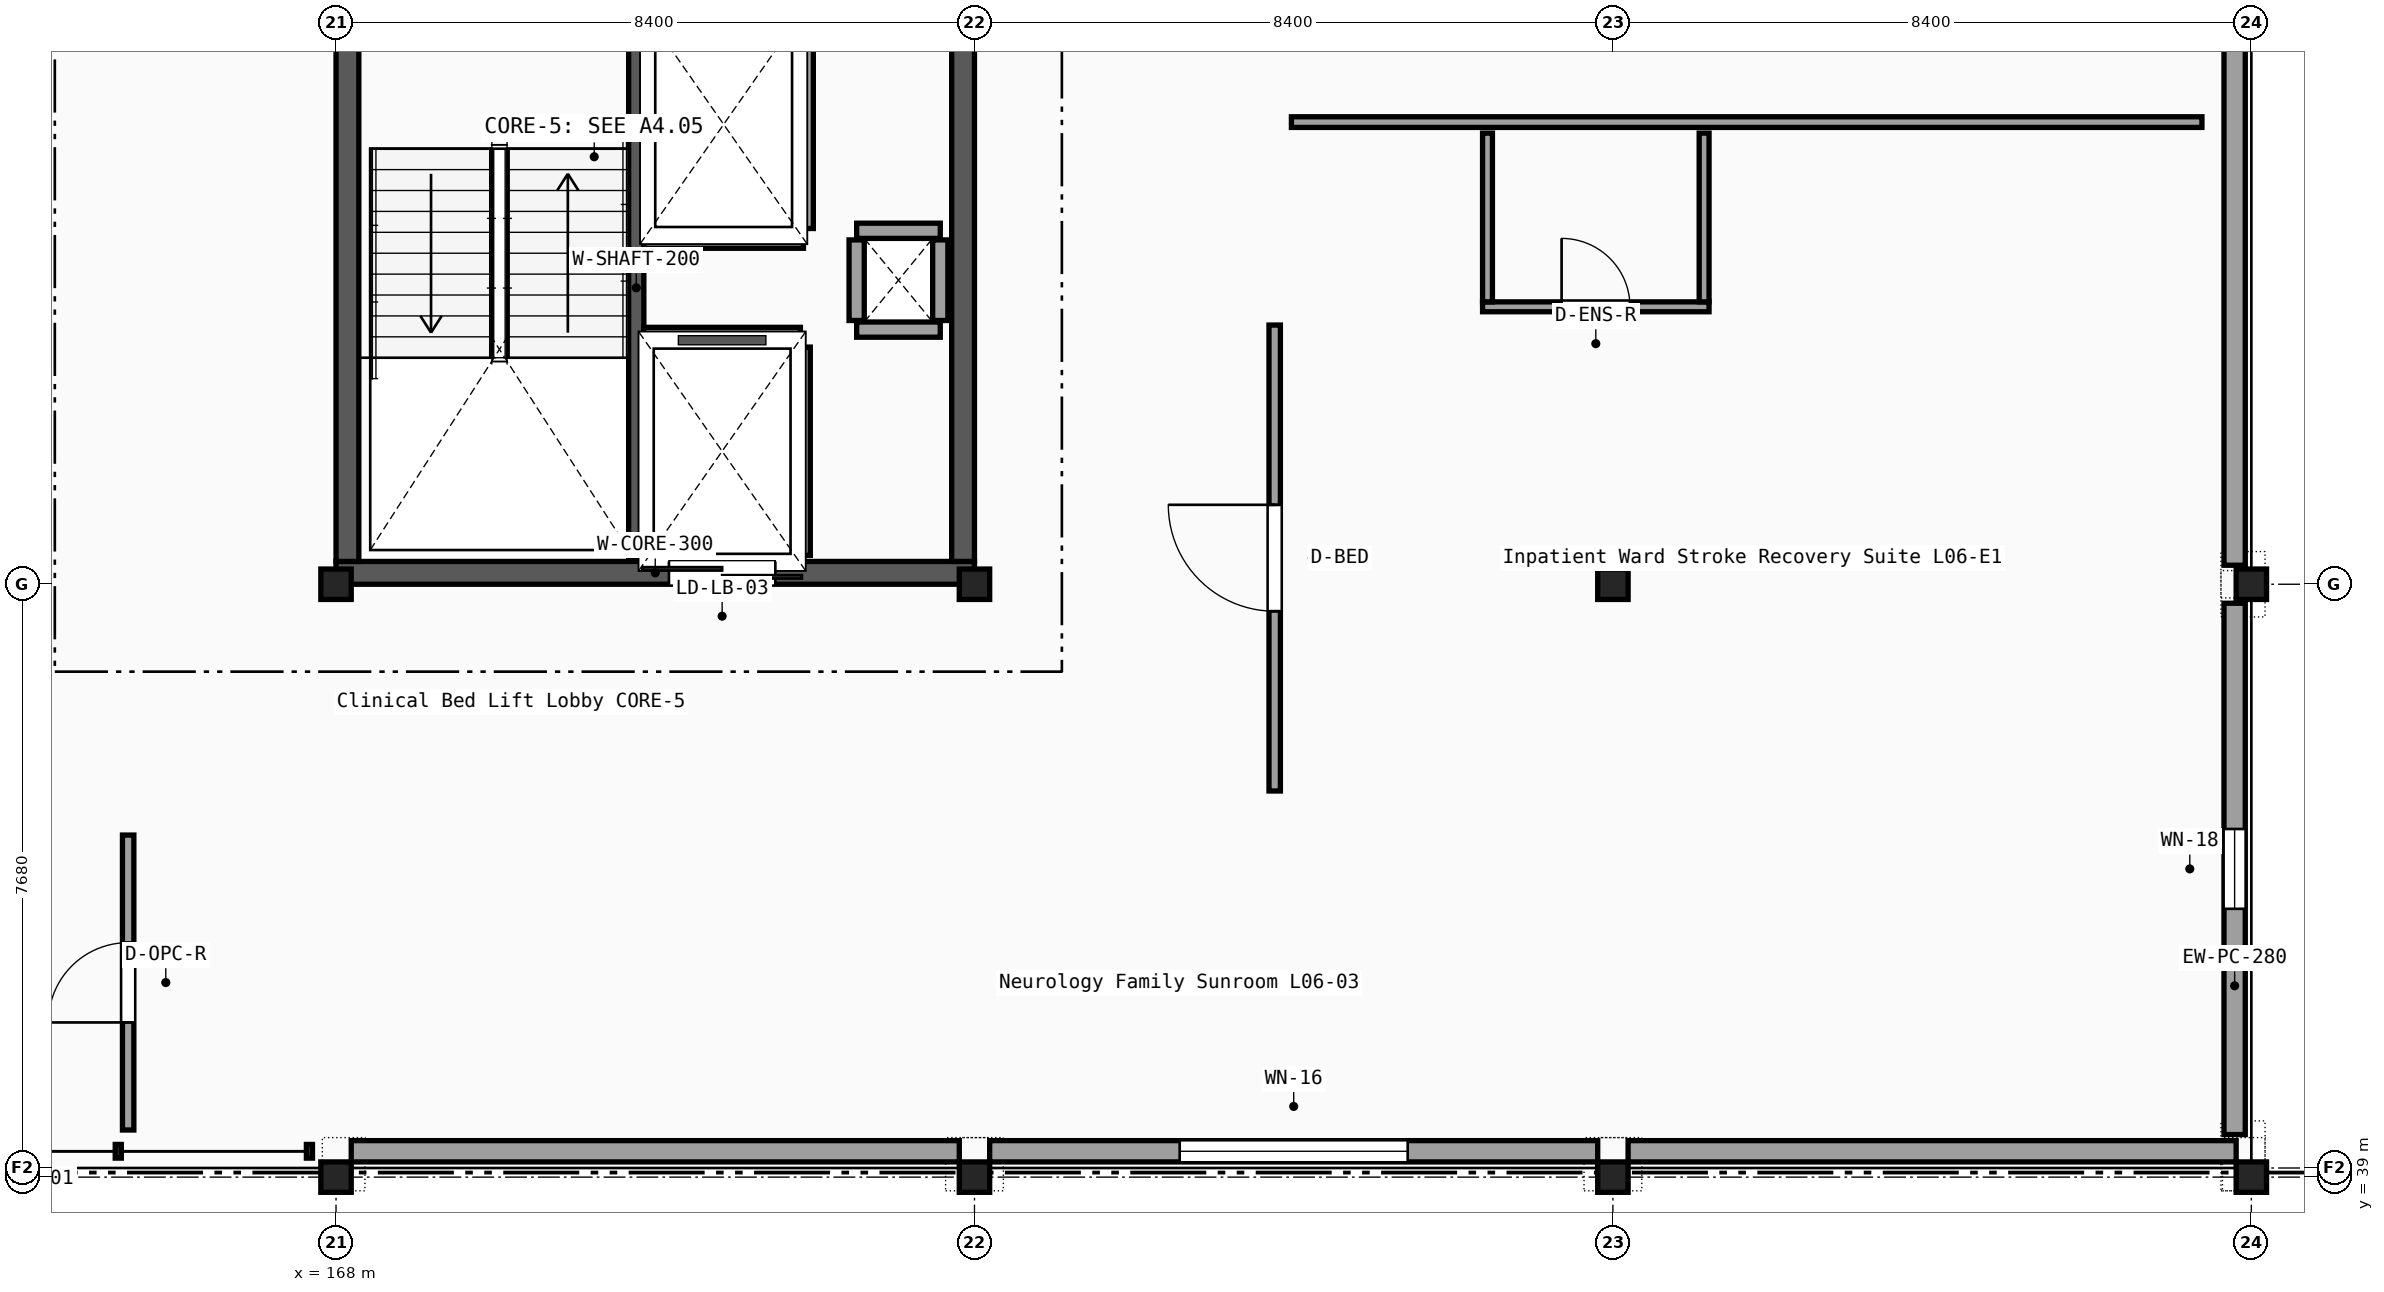
"""IFC4 building model, lengths in metres.
Left out: names, types, materials, properties, quantities, classifications, styles, units other than length and angle.
Written with IfcOpenShell. Run it as: python <this file> out.ifc"""

import sys

from ifc_helpers import new_model, si_unit, direction, frame, frame_2d, origin, origin_2d, place, context, subcontext, project, spatial, rectangle, i_section, extrude, element, fill, save


model = new_model("IFC4")
c1 = context("Model", 3, precision=1e-05, world=origin(), true_north=direction((0.0, 1.0)))
c2 = subcontext(c1, "Body", "Model", "MODEL_VIEW")
j1 = project(units=[si_unit("LENGTHUNIT", "METRE"), si_unit("PLANEANGLEUNIT", "RADIAN")], contexts=[c1])
p1 = place(None, origin())
s1 = spatial("IfcSite", under=j1, at=p1, CompositionType="ELEMENT")
p2 = place(p1, origin())
s2 = spatial("IfcBuilding", under=s1, at=p2, CompositionType="ELEMENT")
p3 = place(p2, frame((0.0, 0.0, 27.0)))
s3 = spatial("IfcBuildingStorey", under=s2, at=p3, CompositionType="ELEMENT", Elevation=27.0)
for number, where, z_axis, x_axis in (
    (1, (168.0, 39.0, 0.0), (0.0, 0.0, 1.0), (1.0, 0.0, 0.0)),
    (2, (168.0, 46.8, 0.0), (0.0, 0.0, 1.0), (1.0, 0.0, 0.0)),
    (3, (176.4, 39.0, 0.0), (0.0, 0.0, 1.0), (1.0, 0.0, 0.0)),
    (4, (176.4, 46.8, 0.0), (0.0, 0.0, 1.0), (1.0, 0.0, 0.0)),
    (5, (184.8, 39.0, 0.0), (0.0, 0.0, 1.0), (1.0, 0.0, 0.0)),
    (6, (184.8, 46.8, 0.0), (0.0, 0.0, 1.0), (1.0, 0.0, 0.0)),
    (7, (193.2, 39.0, 0.0), (0.0, 0.0, 1.0), (1.0, 0.0, 0.0)),
    (8, (193.2, 46.8, 0.0), (0.0, 0.0, 1.0), (1.0, 0.0, 0.0)),
):
    element("IfcColumn", number, at=place(p3, frame(where, z_axis=z_axis, x_axis=x_axis)), inside=s3, PredefinedType="COLUMN", context=c2, shape_type="SweptSolid", body=[
        extrude(i_section(OverallWidth=0.3, OverallDepth=0.4, WebThickness=0.013, FlangeThickness=0.024, FilletRadius=0.027, at=origin_2d()), origin(), (0.0, 0.0, 1.0), 4.05),
    ])
p4 = place(p3, frame((168.2, 39.34, 0.0), z_axis=(0.0, 0.0, 1.0), x_axis=(1.0, 0.0, 0.0)))
e9 = element("IfcWall", 9, at=p4, inside=s3, PredefinedType="SOLIDWALL", context=c2, shape_type="SweptSolid", body=[
    extrude(rectangle(XDim=8.0, YDim=0.28, at=frame_2d((4.0, 0.0))), origin(), (0.0, 0.0, 1.0), 3.53),
])
p5 = place(p3, frame((176.6, 39.34, 0.0), z_axis=(0.0, 0.0, 1.0), x_axis=(1.0, 0.0, 0.0)))
e10 = element("IfcWall", 10, at=p5, inside=s3, PredefinedType="SOLIDWALL", context=c2, shape_type="SweptSolid", body=[
    extrude(rectangle(XDim=8.0, YDim=0.28, at=frame_2d((4.0, 0.0))), origin(), (0.0, 0.0, 1.0), 3.53),
])
p6 = place(p5, frame((2.5, 0.0, 0.7)))
e11 = element("IfcOpeningElement", 11, at=p6, cuts=e10, PredefinedType="OPENING", context=c2, shape_type="SweptSolid", body=[
    extrude(rectangle(XDim=3.0, YDim=1.85, at=frame_2d((1.5, 0.925))), frame((0.0, 0.15, 0.0), z_axis=(0.0, -1.0, 0.0), x_axis=(1.0, 0.0, 0.0)), (0.0, 0.0, 1.0), 0.3),
])
p7 = place(p3, frame((185.0, 39.34, 0.0), z_axis=(0.0, 0.0, 1.0), x_axis=(1.0, 0.0, 0.0)))
e12 = element("IfcWall", 12, at=p7, inside=s3, PredefinedType="SOLIDWALL", context=c2, shape_type="SweptSolid", body=[
    extrude(rectangle(XDim=8.0, YDim=0.28, at=frame_2d((4.0, 0.0))), origin(), (0.0, 0.0, 1.0), 3.53),
])
p8 = place(p3, frame((192.98, 39.56, 0.0), z_axis=(0.0, 0.0, 1.0), x_axis=(0.0, 1.0, 0.0)))
e13 = element("IfcWall", 13, at=p8, inside=s3, PredefinedType="SOLIDWALL", context=c2, shape_type="SweptSolid", body=[
    extrude(rectangle(XDim=6.99, YDim=0.28, at=frame_2d((3.495, 0.0))), origin(), (0.0, 0.0, 1.0), 3.26),
])
p9 = place(p8, frame((2.97, 0.0, 1.3)))
e14 = element("IfcOpeningElement", 14, at=p9, cuts=e13, PredefinedType="OPENING", context=c2, shape_type="SweptSolid", body=[
    extrude(rectangle(XDim=1.05, YDim=1.2, at=frame_2d((0.525, 0.6))), frame((0.0, 0.15, 0.0), z_axis=(0.0, -1.0, 0.0), x_axis=(1.0, 0.0, 0.0)), (0.0, 0.0, 1.0), 0.3),
])
p10 = place(p3, frame((192.98, 47.05, 0.0), z_axis=(0.0, 0.0, 1.0), x_axis=(0.0, 1.0, 0.0)))
e15 = element("IfcWall", 15, at=p10, inside=s3, PredefinedType="SOLIDWALL", context=c2, shape_type="SweptSolid", body=[
    extrude(rectangle(XDim=7.3, YDim=0.28, at=frame_2d((3.65, 0.0))), origin(), (0.0, 0.0, 1.0), 3.26),
])
p11 = place(p3, frame((168.0, 46.95, 0.0), z_axis=(0.0, 0.0, 1.0), x_axis=(1.0, 0.0, 0.0)))
e16 = element("IfcWall", 16, at=p11, inside=s3, PredefinedType="SHEAR", context=c2, shape_type="SweptSolid", body=[
    extrude(rectangle(XDim=8.4, YDim=0.3, at=frame_2d((4.2, 0.0))), origin(), (0.0, 0.0, 1.0), 3.83),
])
p12 = place(p11, frame((4.38, 0.0, 0.0)))
e17 = element("IfcOpeningElement", 17, at=p12, cuts=e16, PredefinedType="OPENING", context=c2, shape_type="SweptSolid", body=[
    extrude(rectangle(XDim=1.4, YDim=2.2, at=frame_2d((0.7, 1.1))), frame((0.0, 0.16, 0.0), z_axis=(0.0, -1.0, 0.0), x_axis=(1.0, 0.0, 0.0)), (0.0, 0.0, 1.0), 0.32),
])
for number, where, z_axis, x_axis in (
    (18, (168.15, 47.1, 0.0), (0.0, 0.0, 1.0), (0.0, 1.0, 0.0)),
    (19, (176.25, 47.1, 0.0), (0.0, 0.0, 1.0), (0.0, 1.0, 0.0)),
):
    element("IfcWall", number, at=place(p3, frame(where, z_axis=z_axis, x_axis=x_axis)), inside=s3, PredefinedType="SHEAR", context=c2, shape_type="SweptSolid", body=[
        extrude(rectangle(XDim=7.2, YDim=0.3, at=frame_2d((3.6, 0.0))), origin(), (0.0, 0.0, 1.0), 3.83),
    ])
p13 = place(p3, frame((171.95, 47.12, 0.0), z_axis=(0.0, 0.0, 1.0), x_axis=(0.0, 1.0, 0.0)))
e20 = element("IfcWall", 20, at=p13, inside=s3, PredefinedType="SHEAR", context=c2, shape_type="SweptSolid", body=[
    extrude(rectangle(XDim=7.16, YDim=0.2, at=frame_2d((3.58, 0.0))), origin(), (0.0, 0.0, 1.0), 3.83),
])
for number, where, z_axis, x_axis in (
    (21, (174.85, 50.15, 0.0), (0.0, 0.0, 1.0), (1.0, 0.0, 0.0)),
    (22, (174.85, 51.45, 0.0), (0.0, 0.0, 1.0), (1.0, 0.0, 0.0)),
):
    element("IfcWall", number, at=place(p3, frame(where, z_axis=z_axis, x_axis=x_axis)), inside=s3, PredefinedType="PARTITIONING", context=c2, shape_type="SweptSolid", body=[
        extrude(rectangle(XDim=1.1, YDim=0.2, at=frame_2d((0.55, 0.0))), origin(), (0.0, 0.0, 1.0), 3.26),
    ])
for number, where, z_axis, x_axis in (
    (23, (174.85, 50.27, 0.0), (0.0, 0.0, 1.0), (0.0, 1.0, 0.0)),
    (24, (175.95, 50.27, 0.0), (0.0, 0.0, 1.0), (0.0, 1.0, 0.0)),
):
    element("IfcWall", number, at=place(p3, frame(where, z_axis=z_axis, x_axis=x_axis)), inside=s3, PredefinedType="PARTITIONING", context=c2, shape_type="SweptSolid", body=[
        extrude(rectangle(XDim=1.06, YDim=0.2, at=frame_2d((0.53, 0.0))), origin(), (0.0, 0.0, 1.0), 3.26),
    ])
p14 = place(p3, frame((174.18, 51.48, 0.0), z_axis=(0.0, 0.0, 1.0), x_axis=(0.0, 1.0, 0.0)))
e25 = element("IfcWall", 25, at=p14, inside=s3, PredefinedType="PARTITIONING", context=c2, shape_type="SweptSolid", body=[
    extrude(rectangle(XDim=2.74, YDim=0.2, at=frame_2d((1.37, 0.0))), origin(), (0.0, 0.0, 1.0), 3.26),
])
p15 = place(p3, frame((172.05, 51.32, 0.0), z_axis=(0.0, 0.0, 1.0), x_axis=(1.0, 0.0, 0.0)))
e26 = element("IfcWall", 26, at=p15, inside=s3, PredefinedType="PARTITIONING", context=c2, shape_type="SweptSolid", body=[
    extrude(rectangle(XDim=2.1, YDim=0.2, at=frame_2d((1.05, 0.0))), origin(), (0.0, 0.0, 1.0), 3.26),
])
p16 = place(p3, frame((174.14, 47.18, 0.0), z_axis=(0.0, 0.0, 1.0), x_axis=(0.0, 1.0, 0.0)))
e27 = element("IfcWall", 27, at=p16, inside=s3, PredefinedType="PARTITIONING", context=c2, shape_type="SweptSolid", body=[
    extrude(rectangle(XDim=2.74, YDim=0.2, at=frame_2d((1.37, 0.0))), origin(), (0.0, 0.0, 1.0), 3.26),
])
p17 = place(p3, frame((172.05, 50.08, 0.0), z_axis=(0.0, 0.0, 1.0), x_axis=(1.0, 0.0, 0.0)))
e28 = element("IfcWall", 28, at=p17, inside=s3, PredefinedType="PARTITIONING", context=c2, shape_type="SweptSolid", body=[
    extrude(rectangle(XDim=2.06, YDim=0.2, at=frame_2d((1.03, 0.0))), origin(), (0.0, 0.0, 1.0), 3.26),
])
p18 = place(p3, frame((165.265, 39.62, 0.0), z_axis=(0.0, 0.0, 1.0), x_axis=(0.0, 1.0, 0.0)))
e29 = element("IfcWall", 29, at=p18, inside=s3, PredefinedType="PARTITIONING", context=c2, shape_type="SweptSolid", body=[
    extrude(rectangle(XDim=3.88, YDim=0.15, at=frame_2d((1.94, 0.0))), origin(), (0.0, 0.0, 1.0), 3.77),
])
p19 = place(p18, frame((1.415, 0.0, 0.0)))
e30 = element("IfcOpeningElement", 30, at=p19, cuts=e29, PredefinedType="OPENING", context=c2, shape_type="SweptSolid", body=[
    extrude(rectangle(XDim=1.05, YDim=2.15, at=frame_2d((0.525, 1.075))), frame((0.0, 0.085, 0.0), z_axis=(0.0, -1.0, 0.0), x_axis=(1.0, 0.0, 0.0)), (0.0, 0.0, 1.0), 0.17),
])
p20 = place(p3, frame((180.35, 44.08, 0.0), z_axis=(0.0, 0.0, 1.0), x_axis=(0.0, 1.0, 0.0)))
e31 = element("IfcWall", 31, at=p20, inside=s3, PredefinedType="PARTITIONING", context=c2, shape_type="SweptSolid", body=[
    extrude(rectangle(XDim=6.13, YDim=0.15, at=frame_2d((3.065, 0.0))), origin(), (0.0, 0.0, 1.0), 3.26),
])
p21 = place(p20, frame((2.365, 0.0, 0.0)))
e32 = element("IfcOpeningElement", 32, at=p21, cuts=e31, PredefinedType="OPENING", context=c2, shape_type="SweptSolid", body=[
    extrude(rectangle(XDim=1.4, YDim=2.2, at=frame_2d((0.7, 1.1))), frame((0.0, 0.085, 0.0), z_axis=(0.0, -1.0, 0.0), x_axis=(1.0, 0.0, 0.0)), (0.0, 0.0, 1.0), 0.17),
])
p22 = place(p3, frame((180.57, 52.88, 0.0), z_axis=(0.0, 0.0, 1.0), x_axis=(1.0, 0.0, 0.0)))
e33 = element("IfcWall", 33, at=p22, inside=s3, PredefinedType="PARTITIONING", context=c2, shape_type="SweptSolid", body=[
    extrude(rectangle(XDim=11.98, YDim=0.14, at=frame_2d((5.99, 0.0))), origin(), (0.0, 0.0, 1.0), 3.54),
])
p23 = place(p3, frame((183.085, 50.45, 0.0), z_axis=(0.0, 0.0, 1.0), x_axis=(1.0, 0.0, 0.0)))
e34 = element("IfcWall", 34, at=p23, inside=s3, PredefinedType="PARTITIONING", context=c2, shape_type="SweptSolid", body=[
    extrude(rectangle(XDim=2.98, YDim=0.13, at=frame_2d((1.49, 0.0))), origin(), (0.0, 0.0, 1.0), 3.54),
])
p24 = place(p23, frame((1.04, 0.0, 0.0)))
e35 = element("IfcOpeningElement", 35, at=p24, cuts=e34, PredefinedType="OPENING", context=c2, shape_type="SweptSolid", body=[
    extrude(rectangle(XDim=0.9, YDim=2.1, at=frame_2d((0.45, 1.05))), frame((0.0, 0.075, 0.0), z_axis=(0.0, -1.0, 0.0), x_axis=(1.0, 0.0, 0.0)), (0.0, 0.0, 1.0), 0.15),
])
for number, where, z_axis, x_axis in (
    (36, (183.15, 50.515, 0.0), (0.0, 0.0, 1.0), (0.0, 1.0, 0.0)),
    (37, (186.0, 50.515, 0.0), (0.0, 0.0, 1.0), (0.0, 1.0, 0.0)),
):
    element("IfcWall", number, at=place(p3, frame(where, z_axis=z_axis, x_axis=x_axis)), inside=s3, PredefinedType="PARTITIONING", context=c2, shape_type="SweptSolid", body=[
        extrude(rectangle(XDim=2.22, YDim=0.13, at=frame_2d((1.11, 0.0))), origin(), (0.0, 0.0, 1.0), 3.77),
    ])
p25 = place(p6, origin())
e38 = element("IfcWindow", 38, at=p25, inside=s3, PartitioningType="SINGLE_PANEL", PredefinedType="WINDOW", context=c2, shape_type="SweptSolid", body=[
    extrude(rectangle(XDim=3.0, YDim=1.85, at=frame_2d((1.5, 0.925))), frame((0.0, 0.03, 0.0), z_axis=(0.0, -1.0, 0.0), x_axis=(1.0, 0.0, 0.0)), (0.0, 0.0, 1.0), 0.06),
])
fill(e11, e38)
p26 = place(p9, origin())
e39 = element("IfcWindow", 39, at=p26, inside=s3, PartitioningType="SINGLE_PANEL", PredefinedType="WINDOW", context=c2, shape_type="SweptSolid", body=[
    extrude(rectangle(XDim=1.05, YDim=1.2, at=frame_2d((0.525, 0.6))), frame((0.0, 0.03, 0.0), z_axis=(0.0, -1.0, 0.0), x_axis=(1.0, 0.0, 0.0)), (0.0, 0.0, 1.0), 0.06),
])
fill(e14, e39)
p27 = place(p12, origin())
e40 = element("IfcDoor", 40, at=p27, inside=s3, OperationType="DOUBLE_DOOR_SLIDING", PredefinedType="DOOR", context=c2, shape_type="SweptSolid", body=[
    extrude(rectangle(XDim=1.4, YDim=2.2, at=frame_2d((0.7, 1.1))), frame((0.0, 0.025, 0.0), z_axis=(0.0, -1.0, 0.0), x_axis=(1.0, 0.0, 0.0)), (0.0, 0.0, 1.0), 0.05),
])
fill(e17, e40)
p28 = place(p19, origin())
e41 = element("IfcDoor", 41, at=p28, inside=s3, OperationType="SINGLE_SWING_LEFT", PredefinedType="DOOR", context=c2, shape_type="SweptSolid", body=[
    extrude(rectangle(XDim=1.05, YDim=2.15, at=frame_2d((0.525, 1.075))), frame((0.0, 0.025, 0.0), z_axis=(0.0, -1.0, 0.0), x_axis=(1.0, 0.0, 0.0)), (0.0, 0.0, 1.0), 0.05),
])
fill(e30, e41)
p29 = place(p21, origin())
e42 = element("IfcDoor", 42, at=p29, inside=s3, OperationType="SINGLE_SWING_RIGHT", PredefinedType="DOOR", context=c2, shape_type="SweptSolid", body=[
    extrude(rectangle(XDim=1.4, YDim=2.2, at=frame_2d((0.7, 1.1))), frame((0.0, 0.025, 0.0), z_axis=(0.0, -1.0, 0.0), x_axis=(1.0, 0.0, 0.0)), (0.0, 0.0, 1.0), 0.05),
])
fill(e32, e42)
p30 = place(p24, origin())
e43 = element("IfcDoor", 43, at=p30, inside=s3, OperationType="SINGLE_SWING_LEFT", PredefinedType="DOOR", context=c2, shape_type="SweptSolid", body=[
    extrude(rectangle(XDim=0.9, YDim=2.1, at=frame_2d((0.45, 1.05))), frame((0.0, 0.025, 0.0), z_axis=(0.0, -1.0, 0.0), x_axis=(1.0, 0.0, 0.0)), (0.0, 0.0, 1.0), 0.05),
])
fill(e35, e43)
save(model, sys.argv[1])
